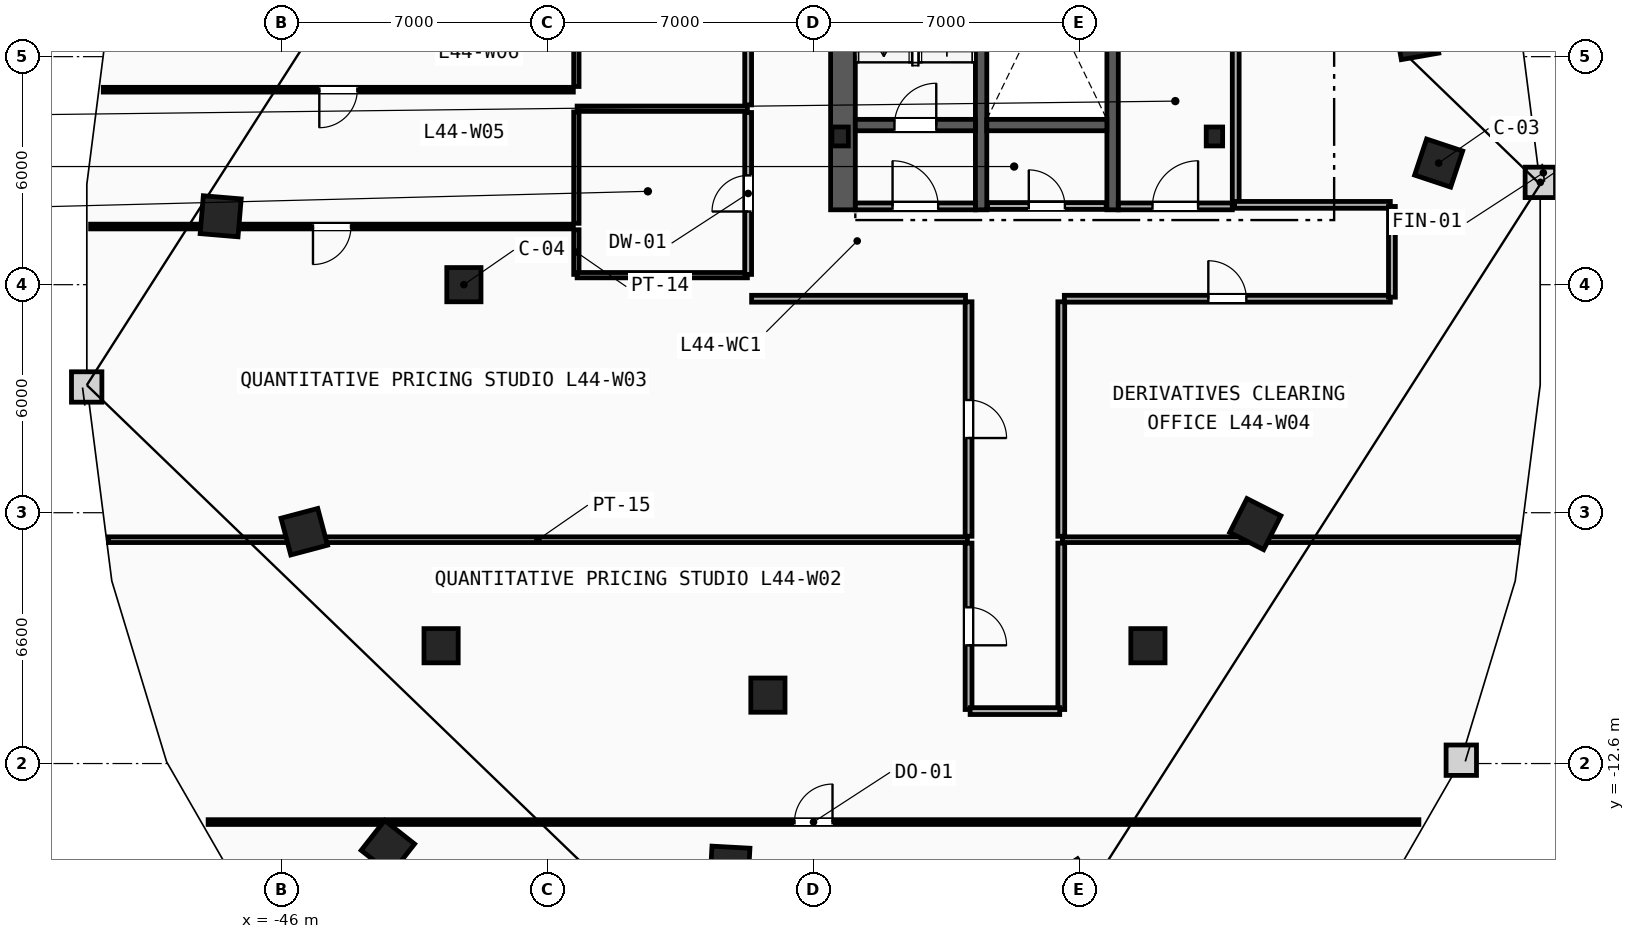
"""IFC4 building model, lengths in metres.
Left out: names, types, materials, properties, quantities, classifications, styles, units other than length and angle.
Written with IfcOpenShell. Run it as: python <this file> out.ifc"""

import sys

from ifc_helpers import new_model, si_unit, direction, frame, frame_2d, origin, origin_2d, place, context, subcontext, project, spatial, rectangle, i_section, extrude, element, fill, save


model = new_model("IFC4")
c1 = context("Model", 3, precision=1e-05, world=origin(), true_north=direction((0.0, 1.0)))
c2 = subcontext(c1, "Body", "Model", "MODEL_VIEW")
j1 = project(units=[si_unit("LENGTHUNIT", "METRE"), si_unit("PLANEANGLEUNIT", "RADIAN")], contexts=[c1])
p1 = place(None, origin())
s1 = spatial("IfcSite", under=j1, at=p1, CompositionType="ELEMENT")
p2 = place(p1, origin())
s2 = spatial("IfcBuilding", under=s1, at=p2, CompositionType="ELEMENT")
p3 = place(p2, frame((0.0, 0.0, 169.2)))
s3 = spatial("IfcBuildingStorey", under=s2, at=p3, CompositionType="ELEMENT", Elevation=169.2)
for number, where, z_axis, x_axis in (
    (1, (-31.3, 3.9, 0.0), (0.0, 0.0, 1.0), (1.0, 0.0, 0.0)),
    (2, (-21.45, 3.9, 0.0), (0.0, 0.0, 1.0), (1.0, 0.0, 0.0)),
):
    element("IfcColumn", number, at=place(p3, frame(where, z_axis=z_axis, x_axis=x_axis)), inside=s3, PredefinedType="COLUMN", context=c2, shape_type="SweptSolid", body=[
        extrude(i_section(OverallWidth=0.432, OverallDepth=0.498, WebThickness=0.056, FlangeThickness=0.089, FilletRadius=0.018, at=origin_2d()), origin(), (0.0, 0.0, 1.0), 3.6),
    ])
for number, where, z_axis, x_axis in (
    (3, (-41.2, 0.0, 0.0), (0.0, 0.0, 1.0), (1.0, 0.0, 0.0)),
    (4, (-41.8, -9.5, 0.0), (0.0, 0.0, 1.0), (1.0, 0.0, 0.0)),
    (5, (-33.2, -10.8, 0.0), (0.0, 0.0, 1.0), (1.0, 0.0, 0.0)),
    (6, (-23.2, -9.5, 0.0), (0.0, 0.0, 1.0), (1.0, 0.0, 0.0)),
):
    element("IfcColumn", number, at=place(p3, frame(where, z_axis=z_axis, x_axis=x_axis)), inside=s3, PredefinedType="COLUMN", context=c2, shape_type="SweptSolid", body=[
        extrude(rectangle(XDim=0.9, YDim=0.9, at=origin_2d()), origin(), (0.0, 0.0, 1.0), 3.6),
    ])
for number, where, z_axis, x_axis in (
    (7, (-15.55, 3.2, 0.0), (0.0, 0.0, 1.0), (0.315, 0.949, 0.0)),
    (8, (-16.125, 6.5, 0.0), (0.0, 0.0, 1.0), (-0.172, 0.985, 0.0)),
    (9, (-47.6, 1.8, 0.0), (0.0, 0.0, 1.0), (-0.084, -0.997, 0.0)),
    (10, (-45.4, -6.5, 0.0), (0.0, 0.0, 1.0), (0.256, -0.967, 0.0)),
    (11, (-43.2, -14.8, 0.0), (0.0, 0.0, 1.0), (0.786, -0.618, 0.0)),
    (12, (-34.2, -15.3, 0.0), (0.0, 0.0, 1.0), (0.998, -0.055, 0.0)),
    (13, (-25.2, -15.8, 0.0), (0.0, 0.0, 1.0), (0.838, 0.546, 0.0)),
    (14, (-20.375, -6.3, 0.0), (0.0, 0.0, 1.0), (0.453, 0.892, 0.0)),
):
    element("IfcColumn", number, at=place(p3, frame(where, z_axis=z_axis, x_axis=x_axis)), inside=s3, PredefinedType="COLUMN", context=c2, shape_type="SweptSolid", body=[
        extrude(rectangle(XDim=1.0, YDim=1.0, at=origin_2d()), origin(), (0.0, 0.0, 1.0), 3.6),
    ])
p4 = place(p3, frame((-31.225, 1.97, 0.0), z_axis=(0.0, 0.0, 1.0), x_axis=(0.0, 1.0, 0.0)))
e15 = element("IfcWall", 15, at=p4, inside=s3, PredefinedType="SHEAR", context=c2, shape_type="SweptSolid", body=[
    extrude(rectangle(XDim=13.33, YDim=0.65, at=frame_2d((6.665, 0.0))), origin(), (0.0, 0.0, 1.0), 3.36),
])
for number, where, z_axis, x_axis in (
    (16, (-27.59, 1.97, 0.0), (0.0, 0.0, 1.0), (0.0, 1.0, 0.0)),
    (17, (-24.13, 1.97, 0.0), (0.0, 0.0, 1.0), (0.0, 1.0, 0.0)),
):
    element("IfcWall", number, at=place(p3, frame(where, z_axis=z_axis, x_axis=x_axis)), inside=s3, PredefinedType="SHEAR", context=c2, shape_type="SweptSolid", body=[
        extrude(rectangle(XDim=10.68, YDim=0.3, at=frame_2d((5.34, 0.0))), origin(), (0.0, 0.0, 1.0), 3.36),
    ])
p5 = place(p3, frame((-30.9, 4.2, 0.0), z_axis=(0.0, 0.0, 1.0), x_axis=(1.0, 0.0, 0.0)))
e18 = element("IfcWall", 18, at=p5, inside=s3, PredefinedType="SHEAR", context=c2, shape_type="SweptSolid", body=[
    extrude(rectangle(XDim=3.16, YDim=0.3, at=frame_2d((1.58, 0.0))), origin(), (0.0, 0.0, 1.0), 3.36),
])
p6 = place(p5, frame((1.03, 0.0, 0.0)))
e19 = element("IfcOpeningElement", 19, at=p6, cuts=e18, PredefinedType="OPENING", context=c2, shape_type="SweptSolid", body=[
    extrude(rectangle(XDim=1.1, YDim=2.15, at=frame_2d((0.55, 1.075))), frame((0.0, 0.16, 0.0), z_axis=(0.0, -1.0, 0.0), x_axis=(1.0, 0.0, 0.0)), (0.0, 0.0, 1.0), 0.32),
])
p7 = place(p3, frame((-27.44, 4.2, 0.0), z_axis=(0.0, 0.0, 1.0), x_axis=(1.0, 0.0, 0.0)))
e20 = element("IfcWall", 20, at=p7, inside=s3, PredefinedType="SHEAR", context=c2, shape_type="SweptSolid", body=[
    extrude(rectangle(XDim=3.16, YDim=0.3, at=frame_2d((1.58, 0.0))), origin(), (0.0, 0.0, 1.0), 3.36),
])
p8 = place(p3, frame((-20.89, 2.15, 0.0), z_axis=(0.0, 0.0, 1.0), x_axis=(0.0, 1.0, 0.0)))
e21 = element("IfcWall", 21, at=p8, inside=s3, PredefinedType="PARTITIONING", context=c2, shape_type="SweptSolid", body=[
    extrude(rectangle(XDim=5.3, YDim=0.18, at=frame_2d((2.65, 0.0))), origin(), (0.0, 0.0, 1.0), 3.36),
])
p9 = place(p3, frame((-23.98, 2.06, 0.0), z_axis=(0.0, 0.0, 1.0), x_axis=(1.0, 0.0, 0.0)))
e22 = element("IfcWall", 22, at=p9, inside=s3, PredefinedType="PARTITIONING", context=c2, shape_type="SweptSolid", body=[
    extrude(rectangle(XDim=3.0, YDim=0.18, at=frame_2d((1.5, 0.0))), origin(), (0.0, 0.0, 1.0), 3.36),
])
p10 = place(p9, frame((0.9, 0.0, 0.0)))
e23 = element("IfcOpeningElement", 23, at=p10, cuts=e22, PredefinedType="OPENING", context=c2, shape_type="SweptSolid", body=[
    extrude(rectangle(XDim=1.2, YDim=2.15, at=frame_2d((0.6, 1.075))), frame((0.0, 0.1, 0.0), z_axis=(0.0, -1.0, 0.0), x_axis=(1.0, 0.0, 0.0)), (0.0, 0.0, 1.0), 0.2),
])
p11 = place(p3, frame((-30.9, 2.06, 0.0), z_axis=(0.0, 0.0, 1.0), x_axis=(1.0, 0.0, 0.0)))
e24 = element("IfcWall", 24, at=p11, inside=s3, PredefinedType="PARTITIONING", context=c2, shape_type="SweptSolid", body=[
    extrude(rectangle(XDim=3.16, YDim=0.18, at=frame_2d((1.58, 0.0))), origin(), (0.0, 0.0, 1.0), 3.36),
])
p12 = place(p11, frame((0.98, 0.0, 0.0)))
e25 = element("IfcOpeningElement", 25, at=p12, cuts=e24, PredefinedType="OPENING", context=c2, shape_type="SweptSolid", body=[
    extrude(rectangle(XDim=1.2, YDim=2.15, at=frame_2d((0.6, 1.075))), frame((0.0, 0.1, 0.0), z_axis=(0.0, -1.0, 0.0), x_axis=(1.0, 0.0, 0.0)), (0.0, 0.0, 1.0), 0.2),
])
p13 = place(p3, frame((-27.42, 2.07, 0.0), z_axis=(0.0, 0.0, 1.0), x_axis=(1.0, 0.0, 0.0)))
e26 = element("IfcWall", 26, at=p13, inside=s3, PredefinedType="PARTITIONING", context=c2, shape_type="SweptSolid", body=[
    extrude(rectangle(XDim=3.12, YDim=0.18, at=frame_2d((1.56, 0.0))), origin(), (0.0, 0.0, 1.0), 3.36),
])
p14 = place(p13, frame((1.085, 0.0, 0.0)))
e27 = element("IfcOpeningElement", 27, at=p14, cuts=e26, PredefinedType="OPENING", context=c2, shape_type="SweptSolid", body=[
    extrude(rectangle(XDim=0.95, YDim=2.1, at=frame_2d((0.475, 1.05))), frame((0.0, 0.1, 0.0), z_axis=(0.0, -1.0, 0.0), x_axis=(1.0, 0.0, 0.0)), (0.0, 0.0, 1.0), 0.2),
])
p15 = place(p3, frame((-38.24, 0.27, 0.0), z_axis=(0.0, 0.0, 1.0), x_axis=(0.0, 1.0, 0.0)))
e28 = element("IfcWall", 28, at=p15, inside=s3, PredefinedType="PARTITIONING", context=c2, shape_type="SweptSolid", body=[
    extrude(rectangle(XDim=1.175, YDim=0.14, at=frame_2d((0.587, 0.0))), origin(), (0.0, 0.0, 1.0), 3.36),
])
p16 = place(p3, frame((-38.24, 1.615, 0.0), z_axis=(0.0, 0.0, 1.0), x_axis=(0.0, 1.0, 0.0)))
e29 = element("IfcWall", 29, at=p16, inside=s3, PredefinedType="PARTITIONING", context=c2, shape_type="SweptSolid", body=[
    extrude(rectangle(XDim=2.93, YDim=0.14, at=frame_2d((1.465, 0.0))), origin(), (0.0, 0.0, 1.0), 3.36),
])
p17 = place(p3, frame((-38.24, 5.215, 0.0), z_axis=(0.0, 0.0, 1.0), x_axis=(0.0, 1.0, 0.0)))
e30 = element("IfcWall", 30, at=p17, inside=s3, PredefinedType="PARTITIONING", context=c2, shape_type="SweptSolid", body=[
    extrude(rectangle(XDim=3.675, YDim=0.14, at=frame_2d((1.837, 0.0))), origin(), (0.0, 0.0, 1.0), 3.36),
])
for number, where, z_axis, x_axis in (
    (31, (-38.22, 0.25, 0.0), (0.0, 0.0, 1.0), (1.0, 0.0, 0.0)),
    (32, (-38.22, 4.63, 0.0), (0.0, 0.0, 1.0), (1.0, 0.0, 0.0)),
):
    element("IfcWall", number, at=place(p3, frame(where, z_axis=z_axis, x_axis=x_axis)), inside=s3, PredefinedType="PARTITIONING", context=c2, shape_type="SweptSolid", body=[
        extrude(rectangle(XDim=4.48, YDim=0.14, at=frame_2d((2.24, 0.0))), origin(), (0.0, 0.0, 1.0), 3.36),
    ])
p18 = place(p3, frame((-33.72, 0.27, 0.0), z_axis=(0.0, 0.0, 1.0), x_axis=(0.0, 1.0, 0.0)))
e33 = element("IfcWall", 33, at=p18, inside=s3, PredefinedType="PARTITIONING", context=c2, shape_type="SweptSolid", body=[
    extrude(rectangle(XDim=4.26, YDim=0.18, at=frame_2d((2.13, 0.0))), origin(), (0.0, 0.0, 1.0), 3.36),
])
p19 = place(p18, frame((1.655, 0.0, 0.0)))
e34 = element("IfcOpeningElement", 34, at=p19, cuts=e33, PredefinedType="OPENING", context=c2, shape_type="SweptSolid", body=[
    extrude(rectangle(XDim=0.95, YDim=2.1, at=frame_2d((0.475, 1.05))), frame((0.0, 0.1, 0.0), z_axis=(0.0, -1.0, 0.0), x_axis=(1.0, 0.0, 0.0)), (0.0, 0.0, 1.0), 0.2),
])
p20 = place(p3, frame((-33.72, 4.73, 0.0), z_axis=(0.0, 0.0, 1.0), x_axis=(0.0, 1.0, 0.0)))
e35 = element("IfcWall", 35, at=p20, inside=s3, PredefinedType="PARTITIONING", context=c2, shape_type="SweptSolid", body=[
    extrude(rectangle(XDim=4.16, YDim=0.18, at=frame_2d((2.08, 0.0))), origin(), (0.0, 0.0, 1.0), 3.36),
])
p21 = place(p20, frame((1.58, 0.0, 0.0)))
e36 = element("IfcOpeningElement", 36, at=p21, cuts=e35, PredefinedType="OPENING", context=c2, shape_type="SweptSolid", body=[
    extrude(rectangle(XDim=1.0, YDim=2.15, at=frame_2d((0.5, 1.075))), frame((0.0, 0.1, 0.0), z_axis=(0.0, -1.0, 0.0), x_axis=(1.0, 0.0, 0.0)), (0.0, 0.0, 1.0), 0.2),
])
p22 = place(p3, frame((-50.553, -6.71, 0.0), z_axis=(0.0, 0.0, 1.0), x_axis=(1.0, 0.0, 0.0)))
e37 = element("IfcWall", 37, at=p22, inside=s3, PredefinedType="PARTITIONING", context=c2, shape_type="SweptSolid", body=[
    extrude(rectangle(XDim=22.603, YDim=0.15, at=frame_2d((11.302, 0.0))), origin(), (0.0, 0.0, 1.0), 3.36),
])
p23 = place(p3, frame((-25.45, -6.71, 0.0), z_axis=(0.0, 0.0, 1.0), x_axis=(1.0, 0.0, 0.0)))
e38 = element("IfcWall", 38, at=p23, inside=s3, PredefinedType="PARTITIONING", context=c2, shape_type="SweptSolid", body=[
    extrude(rectangle(XDim=12.003, YDim=0.15, at=frame_2d((6.001, 0.0))), origin(), (0.0, 0.0, 1.0), 3.36),
])
p24 = place(p3, frame((-27.92, -6.8, 0.0), z_axis=(0.0, 0.0, 1.0), x_axis=(0.0, -1.0, 0.0)))
e39 = element("IfcWall", 39, at=p24, inside=s3, PredefinedType="PARTITIONING", context=c2, shape_type="SweptSolid", body=[
    extrude(rectangle(XDim=4.378, YDim=0.18, at=frame_2d((2.189, 0.0))), origin(), (0.0, 0.0, 1.0), 3.36),
])
p25 = place(p24, frame((1.689, 0.0, 0.0)))
e40 = element("IfcOpeningElement", 40, at=p25, cuts=e39, PredefinedType="OPENING", context=c2, shape_type="SweptSolid", body=[
    extrude(rectangle(XDim=1.0, YDim=2.15, at=frame_2d((0.5, 1.075))), frame((0.0, 0.1, 0.0), z_axis=(0.0, -1.0, 0.0), x_axis=(1.0, 0.0, 0.0)), (0.0, 0.0, 1.0), 0.2),
])
p26 = place(p3, frame((-25.48, -11.178, 0.0), z_axis=(0.0, 0.0, 1.0), x_axis=(0.0, 1.0, 0.0)))
e41 = element("IfcWall", 41, at=p26, inside=s3, PredefinedType="PARTITIONING", context=c2, shape_type="SweptSolid", body=[
    extrude(rectangle(XDim=4.378, YDim=0.18, at=frame_2d((2.189, 0.0))), origin(), (0.0, 0.0, 1.0), 3.36),
])
p27 = place(p3, frame((-27.878, -11.22, 0.0), z_axis=(0.0, 0.0, 1.0), x_axis=(1.0, 0.0, 0.0)))
e42 = element("IfcWall", 42, at=p27, inside=s3, PredefinedType="PARTITIONING", context=c2, shape_type="SweptSolid", body=[
    extrude(rectangle(XDim=2.357, YDim=0.18, at=frame_2d((1.178, 0.0))), origin(), (0.0, 0.0, 1.0), 3.36),
])
p28 = place(p3, frame((-27.92, -0.45, 0.0), z_axis=(0.0, 0.0, 1.0), x_axis=(0.0, -1.0, 0.0)))
e43 = element("IfcWall", 43, at=p28, inside=s3, PredefinedType="PARTITIONING", context=c2, shape_type="SweptSolid", body=[
    extrude(rectangle(XDim=6.17, YDim=0.18, at=frame_2d((3.085, 0.0))), origin(), (0.0, 0.0, 1.0), 3.36),
])
p29 = place(p28, frame((2.585, 0.0, 0.0)))
e44 = element("IfcOpeningElement", 44, at=p29, cuts=e43, PredefinedType="OPENING", context=c2, shape_type="SweptSolid", body=[
    extrude(rectangle(XDim=1.0, YDim=2.15, at=frame_2d((0.5, 1.075))), frame((0.0, 0.1, 0.0), z_axis=(0.0, -1.0, 0.0), x_axis=(1.0, 0.0, 0.0)), (0.0, 0.0, 1.0), 0.2),
])
p30 = place(p3, frame((-33.628, -0.37, 0.0), z_axis=(0.0, 0.0, 1.0), x_axis=(1.0, 0.0, 0.0)))
e45 = element("IfcWall", 45, at=p30, inside=s3, PredefinedType="PARTITIONING", context=c2, shape_type="SweptSolid", body=[
    extrude(rectangle(XDim=5.628, YDim=0.18, at=frame_2d((2.814, 0.0))), origin(), (0.0, 0.0, 1.0), 3.36),
])
p31 = place(p3, frame((-25.4, -0.37, 0.0), z_axis=(0.0, 0.0, 1.0), x_axis=(1.0, 0.0, 0.0)))
e46 = element("IfcWall", 46, at=p31, inside=s3, PredefinedType="PARTITIONING", context=c2, shape_type="SweptSolid", body=[
    extrude(rectangle(XDim=8.578, YDim=0.18, at=frame_2d((4.289, 0.0))), origin(), (0.0, 0.0, 1.0), 3.36),
])
p32 = place(p31, frame((3.789, 0.0, 0.0)))
e47 = element("IfcOpeningElement", 47, at=p32, cuts=e46, PredefinedType="OPENING", context=c2, shape_type="SweptSolid", body=[
    extrude(rectangle(XDim=1.0, YDim=2.15, at=frame_2d((0.5, 1.075))), frame((0.0, 0.1, 0.0), z_axis=(0.0, -1.0, 0.0), x_axis=(1.0, 0.0, 0.0)), (0.0, 0.0, 1.0), 0.2),
])
p33 = place(p3, frame((-25.48, -6.62, 0.0), z_axis=(0.0, 0.0, 1.0), x_axis=(0.0, 1.0, 0.0)))
e48 = element("IfcWall", 48, at=p33, inside=s3, PredefinedType="PARTITIONING", context=c2, shape_type="SweptSolid", body=[
    extrude(rectangle(XDim=6.17, YDim=0.18, at=frame_2d((3.085, 0.0))), origin(), (0.0, 0.0, 1.0), 3.36),
])
p34 = place(p3, frame((-16.822, 2.1, 0.0), z_axis=(0.0, 0.0, 1.0), x_axis=(-1.0, 0.0, 0.0)))
e49 = element("IfcWall", 49, at=p34, inside=s3, PredefinedType="PARTITIONING", context=c2, shape_type="SweptSolid", body=[
    extrude(rectangle(XDim=4.098, YDim=0.18, at=frame_2d((2.049, 0.0))), origin(), (0.0, 0.0, 1.0), 3.36),
])
p35 = place(p3, frame((-16.78, -0.329, 0.0), z_axis=(0.0, 0.0, 1.0), x_axis=(0.0, 1.0, 0.0)))
e50 = element("IfcWall", 50, at=p35, inside=s3, PredefinedType="PARTITIONING", context=c2, shape_type="SweptSolid", body=[
    extrude(rectangle(XDim=2.387, YDim=0.18, at=frame_2d((1.194, 0.0))), origin(), (0.0, 0.0, 1.0), 3.36),
])
p36 = place(p3, frame((-47.93, -14.14, 0.0), z_axis=(0.0, 0.0, 1.0), x_axis=(1.0, 0.0, 0.0)))
e51 = element("IfcWall", 51, at=p36, inside=s3, PredefinedType="PARTITIONING", context=c2, shape_type="SweptSolid", body=[
    extrude(rectangle(XDim=31.86, YDim=0.125, at=frame_2d((15.93, 0.0))), origin(), (0.0, 0.0, 1.0), 3.36),
])
p37 = place(p36, frame((15.43, 0.0, 0.0)))
e52 = element("IfcOpeningElement", 52, at=p37, cuts=e51, PredefinedType="OPENING", context=c2, shape_type="SweptSolid", body=[
    extrude(rectangle(XDim=1.0, YDim=2.15, at=frame_2d((0.5, 1.075))), frame((0.0, 0.073, 0.0), z_axis=(0.0, -1.0, 0.0), x_axis=(1.0, 0.0, 0.0)), (0.0, 0.0, 1.0), 0.145),
])
p38 = place(p3, frame((-38.32, 1.53, 0.0), z_axis=(0.0, 0.0, 1.0), x_axis=(-1.0, 0.0, 0.0)))
e53 = element("IfcWall", 53, at=p38, inside=s3, PredefinedType="PARTITIONING", context=c2, shape_type="SweptSolid", body=[
    extrude(rectangle(XDim=12.702, YDim=0.125, at=frame_2d((6.351, 0.0))), origin(), (0.0, 0.0, 1.0), 3.36),
])
p39 = place(p38, frame((5.851, 0.0, 0.0)))
e54 = element("IfcOpeningElement", 54, at=p39, cuts=e53, PredefinedType="OPENING", context=c2, shape_type="SweptSolid", body=[
    extrude(rectangle(XDim=1.0, YDim=2.15, at=frame_2d((0.5, 1.075))), frame((0.0, 0.073, 0.0), z_axis=(0.0, -1.0, 0.0), x_axis=(1.0, 0.0, 0.0)), (0.0, 0.0, 1.0), 0.145),
])
p40 = place(p3, frame((-38.32, 5.13, 0.0), z_axis=(0.0, 0.0, 1.0), x_axis=(-1.0, 0.0, 0.0)))
e55 = element("IfcWall", 55, at=p40, inside=s3, PredefinedType="PARTITIONING", context=c2, shape_type="SweptSolid", body=[
    extrude(rectangle(XDim=12.369, YDim=0.125, at=frame_2d((6.184, 0.0))), origin(), (0.0, 0.0, 1.0), 3.36),
])
p41 = place(p40, frame((5.684, 0.0, 0.0)))
e56 = element("IfcOpeningElement", 56, at=p41, cuts=e55, PredefinedType="OPENING", context=c2, shape_type="SweptSolid", body=[
    extrude(rectangle(XDim=1.0, YDim=2.15, at=frame_2d((0.5, 1.075))), frame((0.0, 0.073, 0.0), z_axis=(0.0, -1.0, 0.0), x_axis=(1.0, 0.0, 0.0)), (0.0, 0.0, 1.0), 0.145),
])
p42 = place(p6, origin())
e57 = element("IfcDoor", 57, at=p42, inside=s3, OperationType="SINGLE_SWING_RIGHT", PredefinedType="DOOR", context=c2, shape_type="SweptSolid", body=[
    extrude(rectangle(XDim=1.1, YDim=2.15, at=frame_2d((0.55, 1.075))), frame((0.0, 0.025, 0.0), z_axis=(0.0, -1.0, 0.0), x_axis=(1.0, 0.0, 0.0)), (0.0, 0.0, 1.0), 0.05),
])
fill(e19, e57)
p43 = place(p10, origin())
e58 = element("IfcDoor", 58, at=p43, inside=s3, OperationType="SINGLE_SWING_RIGHT", PredefinedType="DOOR", context=c2, shape_type="SweptSolid", body=[
    extrude(rectangle(XDim=1.2, YDim=2.15, at=frame_2d((0.6, 1.075))), frame((0.0, 0.025, 0.0), z_axis=(0.0, -1.0, 0.0), x_axis=(1.0, 0.0, 0.0)), (0.0, 0.0, 1.0), 0.05),
])
fill(e23, e58)
p44 = place(p12, origin())
e59 = element("IfcDoor", 59, at=p44, inside=s3, OperationType="SINGLE_SWING_LEFT", PredefinedType="DOOR", context=c2, shape_type="SweptSolid", body=[
    extrude(rectangle(XDim=1.2, YDim=2.15, at=frame_2d((0.6, 1.075))), frame((0.0, 0.025, 0.0), z_axis=(0.0, -1.0, 0.0), x_axis=(1.0, 0.0, 0.0)), (0.0, 0.0, 1.0), 0.05),
])
fill(e25, e59)
p45 = place(p37, origin())
e60 = element("IfcDoor", 60, at=p45, inside=s3, OperationType="SINGLE_SWING_RIGHT", PredefinedType="DOOR", context=c2, shape_type="SweptSolid", body=[
    extrude(rectangle(XDim=1.0, YDim=2.15, at=frame_2d((0.5, 1.075))), frame((0.0, 0.025, 0.0), z_axis=(0.0, -1.0, 0.0), x_axis=(1.0, 0.0, 0.0)), (0.0, 0.0, 1.0), 0.05),
])
fill(e52, e60)
p46 = place(p39, origin())
e61 = element("IfcDoor", 61, at=p46, inside=s3, OperationType="SINGLE_SWING_RIGHT", PredefinedType="DOOR", context=c2, shape_type="SweptSolid", body=[
    extrude(rectangle(XDim=1.0, YDim=2.15, at=frame_2d((0.5, 1.075))), frame((0.0, 0.025, 0.0), z_axis=(0.0, -1.0, 0.0), x_axis=(1.0, 0.0, 0.0)), (0.0, 0.0, 1.0), 0.05),
])
fill(e54, e61)
p47 = place(p41, origin())
e62 = element("IfcDoor", 62, at=p47, inside=s3, OperationType="SINGLE_SWING_RIGHT", PredefinedType="DOOR", context=c2, shape_type="SweptSolid", body=[
    extrude(rectangle(XDim=1.0, YDim=2.15, at=frame_2d((0.5, 1.075))), frame((0.0, 0.025, 0.0), z_axis=(0.0, -1.0, 0.0), x_axis=(1.0, 0.0, 0.0)), (0.0, 0.0, 1.0), 0.05),
])
fill(e56, e62)
p48 = place(p32, origin())
e63 = element("IfcDoor", 63, at=p48, inside=s3, OperationType="SINGLE_SWING_LEFT", PredefinedType="DOOR", context=c2, shape_type="SweptSolid", body=[
    extrude(rectangle(XDim=1.0, YDim=2.15, at=frame_2d((0.5, 1.075))), frame((0.0, 0.025, 0.0), z_axis=(0.0, -1.0, 0.0), x_axis=(1.0, 0.0, 0.0)), (0.0, 0.0, 1.0), 0.05),
])
fill(e47, e63)
p49 = place(p29, origin())
e64 = element("IfcDoor", 64, at=p49, inside=s3, OperationType="SINGLE_SWING_RIGHT", PredefinedType="DOOR", context=c2, shape_type="SweptSolid", body=[
    extrude(rectangle(XDim=1.0, YDim=2.15, at=frame_2d((0.5, 1.075))), frame((0.0, 0.025, 0.0), z_axis=(0.0, -1.0, 0.0), x_axis=(1.0, 0.0, 0.0)), (0.0, 0.0, 1.0), 0.05),
])
fill(e44, e64)
p50 = place(p25, origin())
e65 = element("IfcDoor", 65, at=p50, inside=s3, OperationType="SINGLE_SWING_RIGHT", PredefinedType="DOOR", context=c2, shape_type="SweptSolid", body=[
    extrude(rectangle(XDim=1.0, YDim=2.15, at=frame_2d((0.5, 1.075))), frame((0.0, 0.025, 0.0), z_axis=(0.0, -1.0, 0.0), x_axis=(1.0, 0.0, 0.0)), (0.0, 0.0, 1.0), 0.05),
])
fill(e40, e65)
p51 = place(p19, origin())
e66 = element("IfcDoor", 66, at=p51, inside=s3, OperationType="SINGLE_SWING_LEFT", PredefinedType="DOOR", context=c2, shape_type="SweptSolid", body=[
    extrude(rectangle(XDim=0.95, YDim=2.1, at=frame_2d((0.475, 1.05))), frame((0.0, 0.025, 0.0), z_axis=(0.0, -1.0, 0.0), x_axis=(1.0, 0.0, 0.0)), (0.0, 0.0, 1.0), 0.05),
])
fill(e34, e66)
p52 = place(p14, origin())
e67 = element("IfcDoor", 67, at=p52, inside=s3, OperationType="SINGLE_SWING_LEFT", PredefinedType="DOOR", context=c2, shape_type="SweptSolid", body=[
    extrude(rectangle(XDim=0.95, YDim=2.1, at=frame_2d((0.475, 1.05))), frame((0.0, 0.025, 0.0), z_axis=(0.0, -1.0, 0.0), x_axis=(1.0, 0.0, 0.0)), (0.0, 0.0, 1.0), 0.05),
])
fill(e27, e67)
save(model, sys.argv[1])
